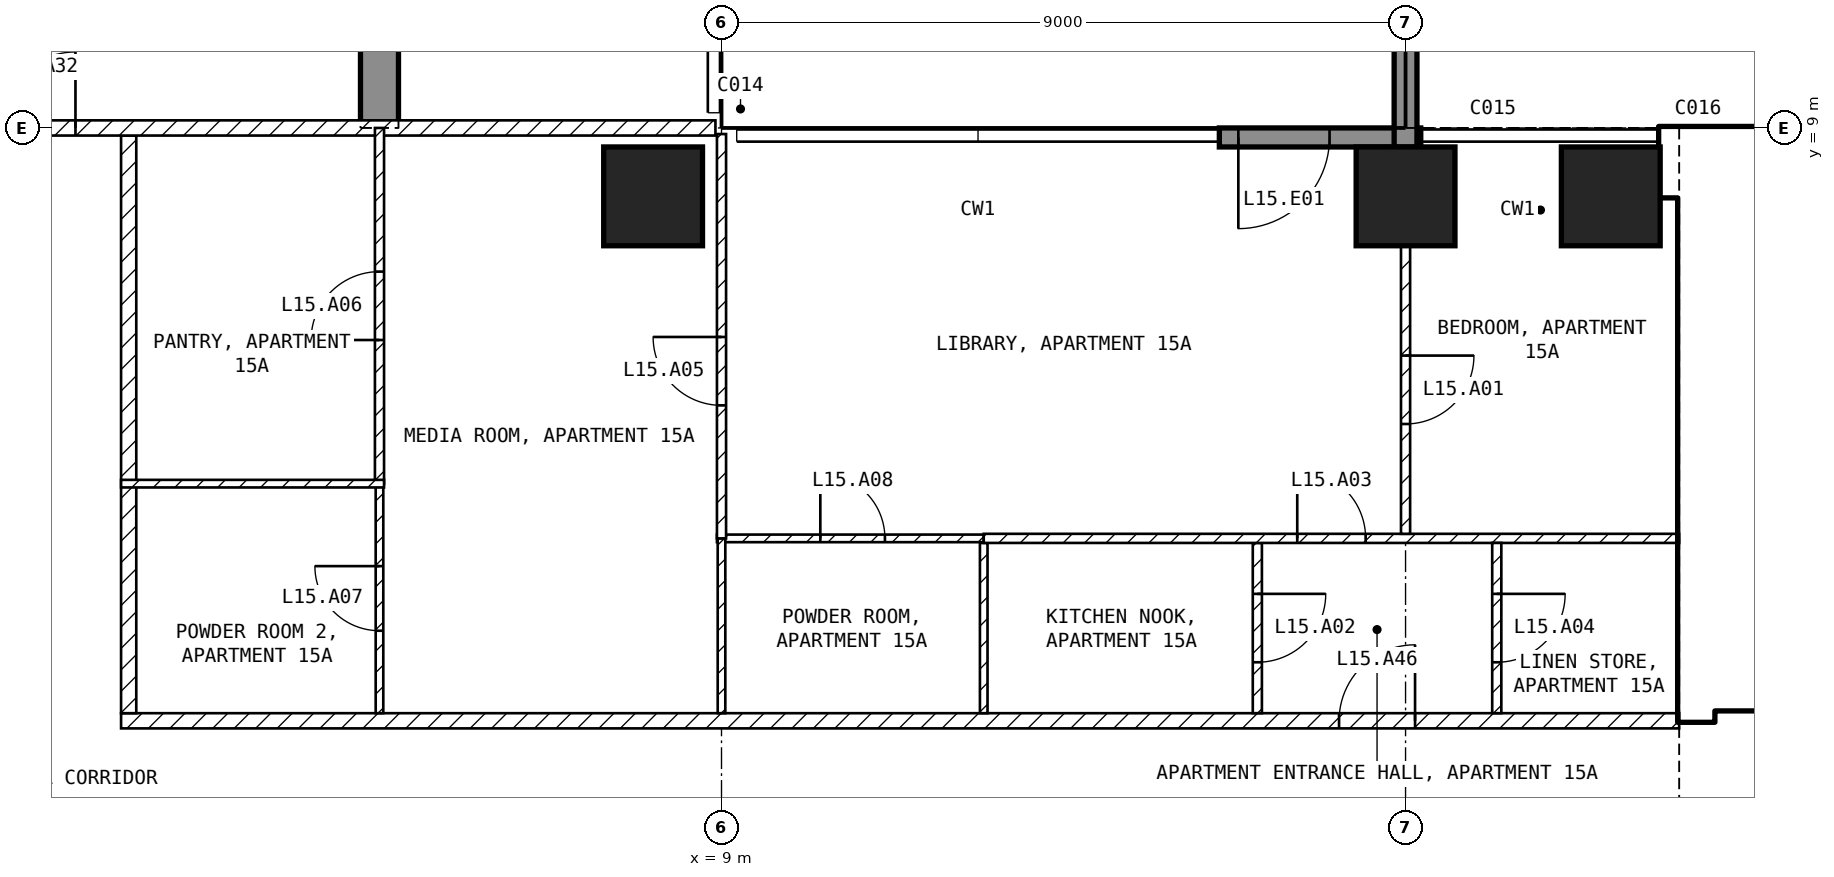
"""IFC4 building model, lengths in metres.
Left out: names, types, materials, properties, quantities, classifications, styles, units other than length and angle.
Written with IfcOpenShell. Run it as: python <this file> out.ifc"""

import sys

from ifc_helpers import new_model, si_unit, direction, frame, frame_2d, origin, origin_2d, place, context, subcontext, project, spatial, polyline, rectangle, outline, extrude, element, fill, save


model = new_model("IFC4")
c1 = context("Model", 3, precision=1e-05, world=origin(), true_north=direction((0.0, 1.0)))
c2 = subcontext(c1, "Body", "Model", "MODEL_VIEW")
j1 = project(units=[si_unit("LENGTHUNIT", "METRE"), si_unit("PLANEANGLEUNIT", "RADIAN")], contexts=[c1])
p1 = place(None, origin())
s1 = spatial("IfcSite", under=j1, at=p1, CompositionType="ELEMENT")
p2 = place(p1, origin())
s2 = spatial("IfcBuilding", under=s1, at=p2, CompositionType="ELEMENT")
p3 = place(p2, frame((0.0, 0.0, 71.5)))
s3 = spatial("IfcBuildingStorey", under=s2, at=p3, CompositionType="ELEMENT", Elevation=71.5)
for number, where, z_axis, x_axis in (
    (1, (8.1, 8.1, -0.25), (0.0, 0.0, 1.0), (1.0, 0.0, 0.0)),
    (2, (18.0, 8.1, -0.25), (0.0, 0.0, 1.0), (1.0, 0.0, 0.0)),
    (3, (20.7, 8.1, -0.25), (0.0, 0.0, 1.0), (1.0, 0.0, 0.0)),
):
    element("IfcColumn", number, at=place(p3, frame(where, z_axis=z_axis, x_axis=x_axis)), inside=s3, PredefinedType="COLUMN", context=c2, shape_type="SweptSolid", body=[
        extrude(rectangle(XDim=1.3, YDim=1.3, at=origin_2d()), origin(), (0.0, 0.0, 1.0), 3.5),
    ])
p4 = place(p3, frame((4.25, 9.0, -0.25), z_axis=(1.0, 0.0, 0.0), x_axis=(0.0, 1.0, 0.0)))
e4 = element("IfcWall", 4, at=p4, inside=s3, PredefinedType="SHEAR", context=c2, shape_type="SweptSolid", body=[
    extrude(outline(polyline([(0.0, 0.0), (2.1, 0.0), (2.1, 2.65), (4.5, 2.65), (4.5, 0.0), (9.9, 0.0), (9.9, 2.65), (12.3, 2.65), (12.3, 0.0), (16.45, 0.0), (16.45, 3.5), (0.0, 3.5), (0.0, 0.0)])), origin(), (0.0, 0.0, 1.0), 0.5),
])
p5 = place(p3, frame((18.2, 8.875, 0.0), z_axis=(0.0, 0.0, 1.0), x_axis=(-1.0, 0.0, 0.0)))
e5 = element("IfcWall", 5, at=p5, inside=s3, PredefinedType="SOLIDWALL", context=c2, shape_type="SweptSolid", body=[
    extrude(rectangle(XDim=2.65, YDim=0.25, at=frame_2d((1.325, 0.0))), origin(), (0.0, 0.0, 1.0), 3.25),
])
p6 = place(p5, frame((1.2, 0.0, 0.0)))
e6 = element("IfcOpeningElement", 6, at=p6, cuts=e5, PredefinedType="OPENING", context=c2, shape_type="SweptSolid", body=[
    extrude(rectangle(XDim=1.2, YDim=2.4, at=frame_2d((0.6, 1.2))), frame((0.0, 0.135, 0.0), z_axis=(0.0, -1.0, 0.0), x_axis=(1.0, 0.0, 0.0)), (0.0, 0.0, 1.0), 0.27),
])
p7 = place(p3, frame((18.0, 8.75, 0.0), z_axis=(0.0, 0.0, 1.0), x_axis=(0.0, 1.0, 0.0)))
e7 = element("IfcWall", 7, at=p7, inside=s3, PredefinedType="SOLIDWALL", context=c2, shape_type="SweptSolid", body=[
    extrude(rectangle(XDim=2.95, YDim=0.3, at=frame_2d((1.475, 0.0))), origin(), (0.0, 0.0, 1.0), 3.25),
])
p8 = place(p3, frame((21.35, 8.55, 0.0), z_axis=(0.0, 0.0, 1.0), x_axis=(1.0, 0.0, 0.0)))
e8 = element("IfcWall", 8, at=p8, inside=s3, PredefinedType="SHEAR", context=c2, shape_type="SweptSolid", body=[
    extrude(rectangle(XDim=10.15, YDim=0.9, at=frame_2d((5.075, 0.0))), origin(), (0.0, 0.0, 1.0), 3.25),
])
p9 = place(p3, frame((21.825, 1.2, 0.0), z_axis=(0.0, 0.0, 1.0), x_axis=(0.0, 1.0, 0.0)))
e9 = element("IfcWall", 9, at=p9, inside=s3, PredefinedType="SHEAR", context=c2, shape_type="SweptSolid", body=[
    extrude(rectangle(XDim=6.9, YDim=0.45, at=frame_2d((3.45, 0.0))), origin(), (0.0, 0.0, 1.0), 3.25),
])
p10 = place(p3, frame((22.05, 1.45, 0.0), z_axis=(0.0, 0.0, 1.0), x_axis=(1.0, 0.0, 0.0)))
e10 = element("IfcWall", 10, at=p10, inside=s3, PredefinedType="SOLIDWALL", context=c2, shape_type="SweptSolid", body=[
    extrude(rectangle(XDim=13.05, YDim=0.2, at=frame_2d((6.525, 0.0))), origin(), (0.0, 0.0, 1.0), 3.25),
])
p11 = place(p10, frame((0.75, 0.0, 0.0)))
e11 = element("IfcOpeningElement", 11, at=p11, cuts=e10, PredefinedType="OPENING", context=c2, shape_type="SweptSolid", body=[
    extrude(rectangle(XDim=1.0, YDim=2.1, at=frame_2d((0.5, 1.05))), frame((0.0, 0.11, 0.0), z_axis=(0.0, -1.0, 0.0), x_axis=(1.0, 0.0, 0.0)), (0.0, 0.0, 1.0), 0.22),
])
p12 = place(p10, frame((3.25, 0.0, 0.0)))
e12 = element("IfcOpeningElement", 12, at=p12, cuts=e10, PredefinedType="OPENING", context=c2, shape_type="SweptSolid", body=[
    extrude(rectangle(XDim=1.0, YDim=2.1, at=frame_2d((0.5, 1.05))), frame((0.0, 0.11, 0.0), z_axis=(0.0, -1.0, 0.0), x_axis=(1.0, 0.0, 0.0)), (0.0, 0.0, 1.0), 0.22),
])
p13 = place(p3, frame((22.05, 5.15, 0.0), z_axis=(0.0, 0.0, 1.0), x_axis=(1.0, 0.0, 0.0)))
e13 = element("IfcWall", 13, at=p13, inside=s3, PredefinedType="SOLIDWALL", context=c2, shape_type="SweptSolid", body=[
    extrude(rectangle(XDim=6.3, YDim=0.2, at=frame_2d((3.15, 0.0))), origin(), (0.0, 0.0, 1.0), 3.25),
])
p14 = place(p13, frame((0.2, 0.0, 0.0)))
e14 = element("IfcOpeningElement", 14, at=p14, cuts=e13, PredefinedType="OPENING", context=c2, shape_type="SweptSolid", body=[
    extrude(rectangle(XDim=1.0, YDim=2.1, at=frame_2d((0.5, 1.05))), frame((0.0, 0.11, 0.0), z_axis=(0.0, -1.0, 0.0), x_axis=(1.0, 0.0, 0.0)), (0.0, 0.0, 1.0), 0.22),
])
p15 = place(p3, frame((1.1, 1.2, 0.0), z_axis=(0.0, 0.0, 1.0), x_axis=(1.0, 0.0, 0.0)))
e15 = element("IfcWall", 15, at=p15, inside=s3, PredefinedType="PARTITIONING", context=c2, shape_type="SweptSolid", body=[
    extrude(rectangle(XDim=20.5, YDim=0.2, at=frame_2d((10.25, 0.0))), origin(), (0.0, 0.0, 1.0), 3.25),
])
p16 = place(p15, frame((16.025, 0.0, 0.0)))
e16 = element("IfcOpeningElement", 16, at=p16, cuts=e15, PredefinedType="OPENING", context=c2, shape_type="SweptSolid", body=[
    extrude(rectangle(XDim=1.0, YDim=2.1, at=frame_2d((0.5, 1.05))), frame((0.0, 0.11, 0.0), z_axis=(0.0, -1.0, 0.0), x_axis=(1.0, 0.0, 0.0)), (0.0, 0.0, 1.0), 0.22),
])
p17 = place(p3, frame((1.2, 8.9, 0.0), z_axis=(0.0, 0.0, 1.0), x_axis=(0.0, -1.0, 0.0)))
e17 = element("IfcWall", 17, at=p17, inside=s3, PredefinedType="PARTITIONING", context=c2, shape_type="SweptSolid", body=[
    extrude(rectangle(XDim=7.6, YDim=0.2, at=frame_2d((3.8, 0.0))), origin(), (0.0, 0.0, 1.0), 3.25),
])
p18 = place(p3, frame((-8.92, 9.0, 0.0), z_axis=(0.0, 0.0, 1.0), x_axis=(1.0, 0.0, 0.0)))
e18 = element("IfcWall", 18, at=p18, inside=s3, PredefinedType="PARTITIONING", context=c2, shape_type="SweptSolid", body=[
    extrude(rectangle(XDim=17.84, YDim=0.2, at=frame_2d((8.92, 0.0))), origin(), (0.0, 0.0, 1.0), 3.25),
])
p19 = place(p18, frame((8.42, 0.0, 0.0)))
e19 = element("IfcOpeningElement", 19, at=p19, cuts=e18, PredefinedType="OPENING", context=c2, shape_type="SweptSolid", body=[
    extrude(rectangle(XDim=1.0, YDim=2.1, at=frame_2d((0.5, 1.05))), frame((0.0, 0.11, 0.0), z_axis=(0.0, -1.0, 0.0), x_axis=(1.0, 0.0, 0.0)), (0.0, 0.0, 1.0), 0.22),
])
p20 = place(p3, frame((12.45, 3.54, 0.0), z_axis=(0.0, 0.0, 1.0), x_axis=(0.0, -1.0, 0.0)))
e20 = element("IfcWall", 20, at=p20, inside=s3, PredefinedType="PARTITIONING", context=c2, shape_type="SweptSolid", body=[
    extrude(rectangle(XDim=2.24, YDim=0.1, at=frame_2d((1.12, 0.0))), origin(), (0.0, 0.0, 1.0), 3.25),
])
p21 = place(p3, frame((8.94, 3.6, 0.0), z_axis=(0.0, 0.0, 1.0), x_axis=(1.0, 0.0, 0.0)))
e21 = element("IfcWall", 21, at=p21, inside=s3, PredefinedType="PARTITIONING", context=c2, shape_type="SweptSolid", body=[
    extrude(rectangle(XDim=3.51, YDim=0.1, at=frame_2d((1.755, 0.0))), origin(), (0.0, 0.0, 1.0), 3.25),
])
p22 = place(p21, frame((1.36, 0.0, 0.0)))
e22 = element("IfcOpeningElement", 22, at=p22, cuts=e21, PredefinedType="OPENING", context=c2, shape_type="SweptSolid", body=[
    extrude(rectangle(XDim=0.85, YDim=2.1, at=frame_2d((0.425, 1.05))), frame((0.0, 0.06, 0.0), z_axis=(0.0, -1.0, 0.0), x_axis=(1.0, 0.0, 0.0)), (0.0, 0.0, 1.0), 0.12),
])
p23 = place(p3, frame((9.0, 1.3, 0.0), z_axis=(0.0, 0.0, 1.0), x_axis=(0.0, 1.0, 0.0)))
e23 = element("IfcWall", 23, at=p23, inside=s3, PredefinedType="PARTITIONING", context=c2, shape_type="SweptSolid", body=[
    extrude(rectangle(XDim=2.3, YDim=0.1, at=frame_2d((1.15, 0.0))), origin(), (0.0, 0.0, 1.0), 3.25),
])
p24 = place(p3, frame((16.05, 3.54, 0.0), z_axis=(0.0, 0.0, 1.0), x_axis=(0.0, -1.0, 0.0)))
e24 = element("IfcWall", 24, at=p24, inside=s3, PredefinedType="PARTITIONING", context=c2, shape_type="SweptSolid", body=[
    extrude(rectangle(XDim=2.24, YDim=0.12, at=frame_2d((1.12, 0.0))), origin(), (0.0, 0.0, 1.0), 3.25),
])
p25 = place(p24, frame((0.67, 0.0, 0.0)))
e25 = element("IfcOpeningElement", 25, at=p25, cuts=e24, PredefinedType="OPENING", context=c2, shape_type="SweptSolid", body=[
    extrude(rectangle(XDim=0.9, YDim=2.1, at=frame_2d((0.45, 1.05))), frame((0.0, 0.07, 0.0), z_axis=(0.0, -1.0, 0.0), x_axis=(1.0, 0.0, 0.0)), (0.0, 0.0, 1.0), 0.14),
])
p26 = place(p3, frame((12.45, 3.6, 0.0), z_axis=(0.0, 0.0, 1.0), x_axis=(1.0, 0.0, 0.0)))
e26 = element("IfcWall", 26, at=p26, inside=s3, PredefinedType="PARTITIONING", context=c2, shape_type="SweptSolid", body=[
    extrude(rectangle(XDim=9.15, YDim=0.12, at=frame_2d((4.575, 0.0))), origin(), (0.0, 0.0, 1.0), 3.25),
])
p27 = place(p26, frame((4.125, 0.0, 0.0)))
e27 = element("IfcOpeningElement", 27, at=p27, cuts=e26, PredefinedType="OPENING", context=c2, shape_type="SweptSolid", body=[
    extrude(rectangle(XDim=0.9, YDim=2.1, at=frame_2d((0.45, 1.05))), frame((0.0, 0.07, 0.0), z_axis=(0.0, -1.0, 0.0), x_axis=(1.0, 0.0, 0.0)), (0.0, 0.0, 1.0), 0.14),
])
p28 = place(p3, frame((19.2, 3.54, 0.0), z_axis=(0.0, 0.0, 1.0), x_axis=(0.0, -1.0, 0.0)))
e28 = element("IfcWall", 28, at=p28, inside=s3, PredefinedType="PARTITIONING", context=c2, shape_type="SweptSolid", body=[
    extrude(rectangle(XDim=2.24, YDim=0.12, at=frame_2d((1.12, 0.0))), origin(), (0.0, 0.0, 1.0), 3.25),
])
p29 = place(p28, frame((0.67, 0.0, 0.0)))
e29 = element("IfcOpeningElement", 29, at=p29, cuts=e28, PredefinedType="OPENING", context=c2, shape_type="SweptSolid", body=[
    extrude(rectangle(XDim=0.9, YDim=2.1, at=frame_2d((0.45, 1.05))), frame((0.0, 0.07, 0.0), z_axis=(0.0, -1.0, 0.0), x_axis=(1.0, 0.0, 0.0)), (0.0, 0.0, 1.0), 0.14),
])
p30 = place(p3, frame((18.0, 7.45, 0.0), z_axis=(0.0, 0.0, 1.0), x_axis=(0.0, -1.0, 0.0)))
e30 = element("IfcWall", 30, at=p30, inside=s3, PredefinedType="PARTITIONING", context=c2, shape_type="SweptSolid", body=[
    extrude(rectangle(XDim=3.79, YDim=0.12, at=frame_2d((1.895, 0.0))), origin(), (0.0, 0.0, 1.0), 2.346),
])
p31 = place(p30, frame((1.445, 0.0, 0.0)))
e31 = element("IfcOpeningElement", 31, at=p31, cuts=e30, PredefinedType="OPENING", context=c2, shape_type="SweptSolid", body=[
    extrude(rectangle(XDim=0.9, YDim=2.1, at=frame_2d((0.45, 1.05))), frame((0.0, 0.07, 0.0), z_axis=(0.0, -1.0, 0.0), x_axis=(1.0, 0.0, 0.0)), (0.0, 0.0, 1.0), 0.14),
])
p32 = place(p3, frame((9.0, 3.6, 0.0), z_axis=(0.0, 0.0, 1.0), x_axis=(0.0, 1.0, 0.0)))
e32 = element("IfcWall", 32, at=p32, inside=s3, PredefinedType="PARTITIONING", context=c2, shape_type="SweptSolid", body=[
    extrude(rectangle(XDim=5.32, YDim=0.12, at=frame_2d((2.66, 0.0))), origin(), (0.0, 0.0, 1.0), 3.25),
])
p33 = place(p32, frame((1.75, 0.0, 0.0)))
e33 = element("IfcOpeningElement", 33, at=p33, cuts=e32, PredefinedType="OPENING", context=c2, shape_type="SweptSolid", body=[
    extrude(rectangle(XDim=0.9, YDim=2.1, at=frame_2d((0.45, 1.05))), frame((0.0, 0.07, 0.0), z_axis=(0.0, -1.0, 0.0), x_axis=(1.0, 0.0, 0.0)), (0.0, 0.0, 1.0), 0.14),
])
p34 = place(p3, frame((4.5, 1.3, 0.0), z_axis=(0.0, 0.0, 1.0), x_axis=(0.0, 1.0, 0.0)))
e34 = element("IfcWall", 34, at=p34, inside=s3, PredefinedType="PARTITIONING", context=c2, shape_type="SweptSolid", body=[
    extrude(rectangle(XDim=3.02, YDim=0.1, at=frame_2d((1.51, 0.0))), origin(), (0.0, 0.0, 1.0), 3.25),
])
p35 = place(p34, frame((1.085, 0.0, 0.0)))
e35 = element("IfcOpeningElement", 35, at=p35, cuts=e34, PredefinedType="OPENING", context=c2, shape_type="SweptSolid", body=[
    extrude(rectangle(XDim=0.85, YDim=2.1, at=frame_2d((0.425, 1.05))), frame((0.0, 0.06, 0.0), z_axis=(0.0, -1.0, 0.0), x_axis=(1.0, 0.0, 0.0)), (0.0, 0.0, 1.0), 0.12),
])
p36 = place(p3, frame((4.5, 4.32, 0.0), z_axis=(0.0, 0.0, 1.0), x_axis=(0.0, 1.0, 0.0)))
e36 = element("IfcWall", 36, at=p36, inside=s3, PredefinedType="PARTITIONING", context=c2, shape_type="SweptSolid", body=[
    extrude(rectangle(XDim=4.68, YDim=0.12, at=frame_2d((2.34, 0.0))), origin(), (0.0, 0.0, 1.0), 3.25),
])
p37 = place(p36, frame((1.89, 0.0, 0.0)))
e37 = element("IfcOpeningElement", 37, at=p37, cuts=e36, PredefinedType="OPENING", context=c2, shape_type="SweptSolid", body=[
    extrude(rectangle(XDim=0.9, YDim=2.1, at=frame_2d((0.45, 1.05))), frame((0.0, 0.07, 0.0), z_axis=(0.0, -1.0, 0.0), x_axis=(1.0, 0.0, 0.0)), (0.0, 0.0, 1.0), 0.14),
])
p38 = place(p3, frame((1.1, 4.32, 0.0), z_axis=(0.0, 0.0, 1.0), x_axis=(1.0, 0.0, 0.0)))
e38 = element("IfcWall", 38, at=p38, inside=s3, PredefinedType="PARTITIONING", context=c2, shape_type="SweptSolid", body=[
    extrude(rectangle(XDim=3.46, YDim=0.1, at=frame_2d((1.73, 0.0))), origin(), (0.0, 0.0, 1.0), 3.25),
])
p39 = place(p6, origin())
e39 = element("IfcDoor", 39, at=p39, inside=s3, OperationType="SINGLE_SWING_RIGHT", PredefinedType="DOOR", context=c2, shape_type="SweptSolid", body=[
    extrude(rectangle(XDim=1.2, YDim=2.4, at=frame_2d((0.6, 1.2))), frame((0.0, 0.025, 0.0), z_axis=(0.0, -1.0, 0.0), x_axis=(1.0, 0.0, 0.0)), (0.0, 0.0, 1.0), 0.05),
])
fill(e6, e39)
p40 = place(p14, origin())
e40 = element("IfcDoor", 40, at=p40, inside=s3, OperationType="SINGLE_SWING_LEFT", PredefinedType="DOOR", context=c2, shape_type="SweptSolid", body=[
    extrude(rectangle(XDim=1.0, YDim=2.1, at=frame_2d((0.5, 1.05))), frame((0.0, 0.025, 0.0), z_axis=(0.0, -1.0, 0.0), x_axis=(1.0, 0.0, 0.0)), (0.0, 0.0, 1.0), 0.05),
])
fill(e14, e40)
p41 = place(p31, origin())
e41 = element("IfcDoor", 41, at=p41, inside=s3, OperationType="SINGLE_SWING_LEFT", PredefinedType="DOOR", context=c2, shape_type="SweptSolid", body=[
    extrude(rectangle(XDim=0.9, YDim=2.1, at=frame_2d((0.45, 1.05))), frame((0.0, 0.025, 0.0), z_axis=(0.0, -1.0, 0.0), x_axis=(1.0, 0.0, 0.0)), (0.0, 0.0, 1.0), 0.05),
])
fill(e31, e41)
p42 = place(p25, origin())
e42 = element("IfcDoor", 42, at=p42, inside=s3, OperationType="SINGLE_SWING_LEFT", PredefinedType="DOOR", context=c2, shape_type="SweptSolid", body=[
    extrude(rectangle(XDim=0.9, YDim=2.1, at=frame_2d((0.45, 1.05))), frame((0.0, 0.025, 0.0), z_axis=(0.0, -1.0, 0.0), x_axis=(1.0, 0.0, 0.0)), (0.0, 0.0, 1.0), 0.05),
])
fill(e25, e42)
p43 = place(p27, origin())
e43 = element("IfcDoor", 43, at=p43, inside=s3, OperationType="SINGLE_SWING_LEFT", PredefinedType="DOOR", context=c2, shape_type="SweptSolid", body=[
    extrude(rectangle(XDim=0.9, YDim=2.1, at=frame_2d((0.45, 1.05))), frame((0.0, 0.025, 0.0), z_axis=(0.0, -1.0, 0.0), x_axis=(1.0, 0.0, 0.0)), (0.0, 0.0, 1.0), 0.05),
])
fill(e27, e43)
p44 = place(p29, origin())
e44 = element("IfcDoor", 44, at=p44, inside=s3, OperationType="SINGLE_SWING_LEFT", PredefinedType="DOOR", context=c2, shape_type="SweptSolid", body=[
    extrude(rectangle(XDim=0.9, YDim=2.1, at=frame_2d((0.45, 1.05))), frame((0.0, 0.025, 0.0), z_axis=(0.0, -1.0, 0.0), x_axis=(1.0, 0.0, 0.0)), (0.0, 0.0, 1.0), 0.05),
])
fill(e29, e44)
p45 = place(p33, origin())
e45 = element("IfcDoor", 45, at=p45, inside=s3, OperationType="SINGLE_SWING_RIGHT", PredefinedType="DOOR", context=c2, shape_type="SweptSolid", body=[
    extrude(rectangle(XDim=0.9, YDim=2.1, at=frame_2d((0.45, 1.05))), frame((0.0, 0.025, 0.0), z_axis=(0.0, -1.0, 0.0), x_axis=(1.0, 0.0, 0.0)), (0.0, 0.0, 1.0), 0.05),
])
fill(e33, e45)
p46 = place(p37, origin())
e46 = element("IfcDoor", 46, at=p46, inside=s3, OperationType="SINGLE_SWING_LEFT", PredefinedType="DOOR", context=c2, shape_type="SweptSolid", body=[
    extrude(rectangle(XDim=0.9, YDim=2.1, at=frame_2d((0.45, 1.05))), frame((0.0, 0.025, 0.0), z_axis=(0.0, -1.0, 0.0), x_axis=(1.0, 0.0, 0.0)), (0.0, 0.0, 1.0), 0.05),
])
fill(e37, e46)
p47 = place(p35, origin())
e47 = element("IfcDoor", 47, at=p47, inside=s3, OperationType="SINGLE_SWING_RIGHT", PredefinedType="DOOR", context=c2, shape_type="SweptSolid", body=[
    extrude(rectangle(XDim=0.85, YDim=2.1, at=frame_2d((0.425, 1.05))), frame((0.0, 0.025, 0.0), z_axis=(0.0, -1.0, 0.0), x_axis=(1.0, 0.0, 0.0)), (0.0, 0.0, 1.0), 0.05),
])
fill(e35, e47)
p48 = place(p22, origin())
e48 = element("IfcDoor", 48, at=p48, inside=s3, OperationType="SINGLE_SWING_LEFT", PredefinedType="DOOR", context=c2, shape_type="SweptSolid", body=[
    extrude(rectangle(XDim=0.85, YDim=2.1, at=frame_2d((0.425, 1.05))), frame((0.0, 0.025, 0.0), z_axis=(0.0, -1.0, 0.0), x_axis=(1.0, 0.0, 0.0)), (0.0, 0.0, 1.0), 0.05),
])
fill(e22, e48)
p49 = place(p19, origin())
e49 = element("IfcDoor", 49, at=p49, inside=s3, OperationType="SINGLE_SWING_RIGHT", PredefinedType="DOOR", context=c2, shape_type="SweptSolid", body=[
    extrude(rectangle(XDim=1.0, YDim=2.1, at=frame_2d((0.5, 1.05))), frame((0.0, 0.025, 0.0), z_axis=(0.0, -1.0, 0.0), x_axis=(1.0, 0.0, 0.0)), (0.0, 0.0, 1.0), 0.05),
])
fill(e19, e49)
p50 = place(p16, origin())
e50 = element("IfcDoor", 50, at=p50, inside=s3, OperationType="SINGLE_SWING_RIGHT", PredefinedType="DOOR", context=c2, shape_type="SweptSolid", body=[
    extrude(rectangle(XDim=1.0, YDim=2.1, at=frame_2d((0.5, 1.05))), frame((0.0, 0.025, 0.0), z_axis=(0.0, -1.0, 0.0), x_axis=(1.0, 0.0, 0.0)), (0.0, 0.0, 1.0), 0.05),
])
fill(e16, e50)
save(model, sys.argv[1])
